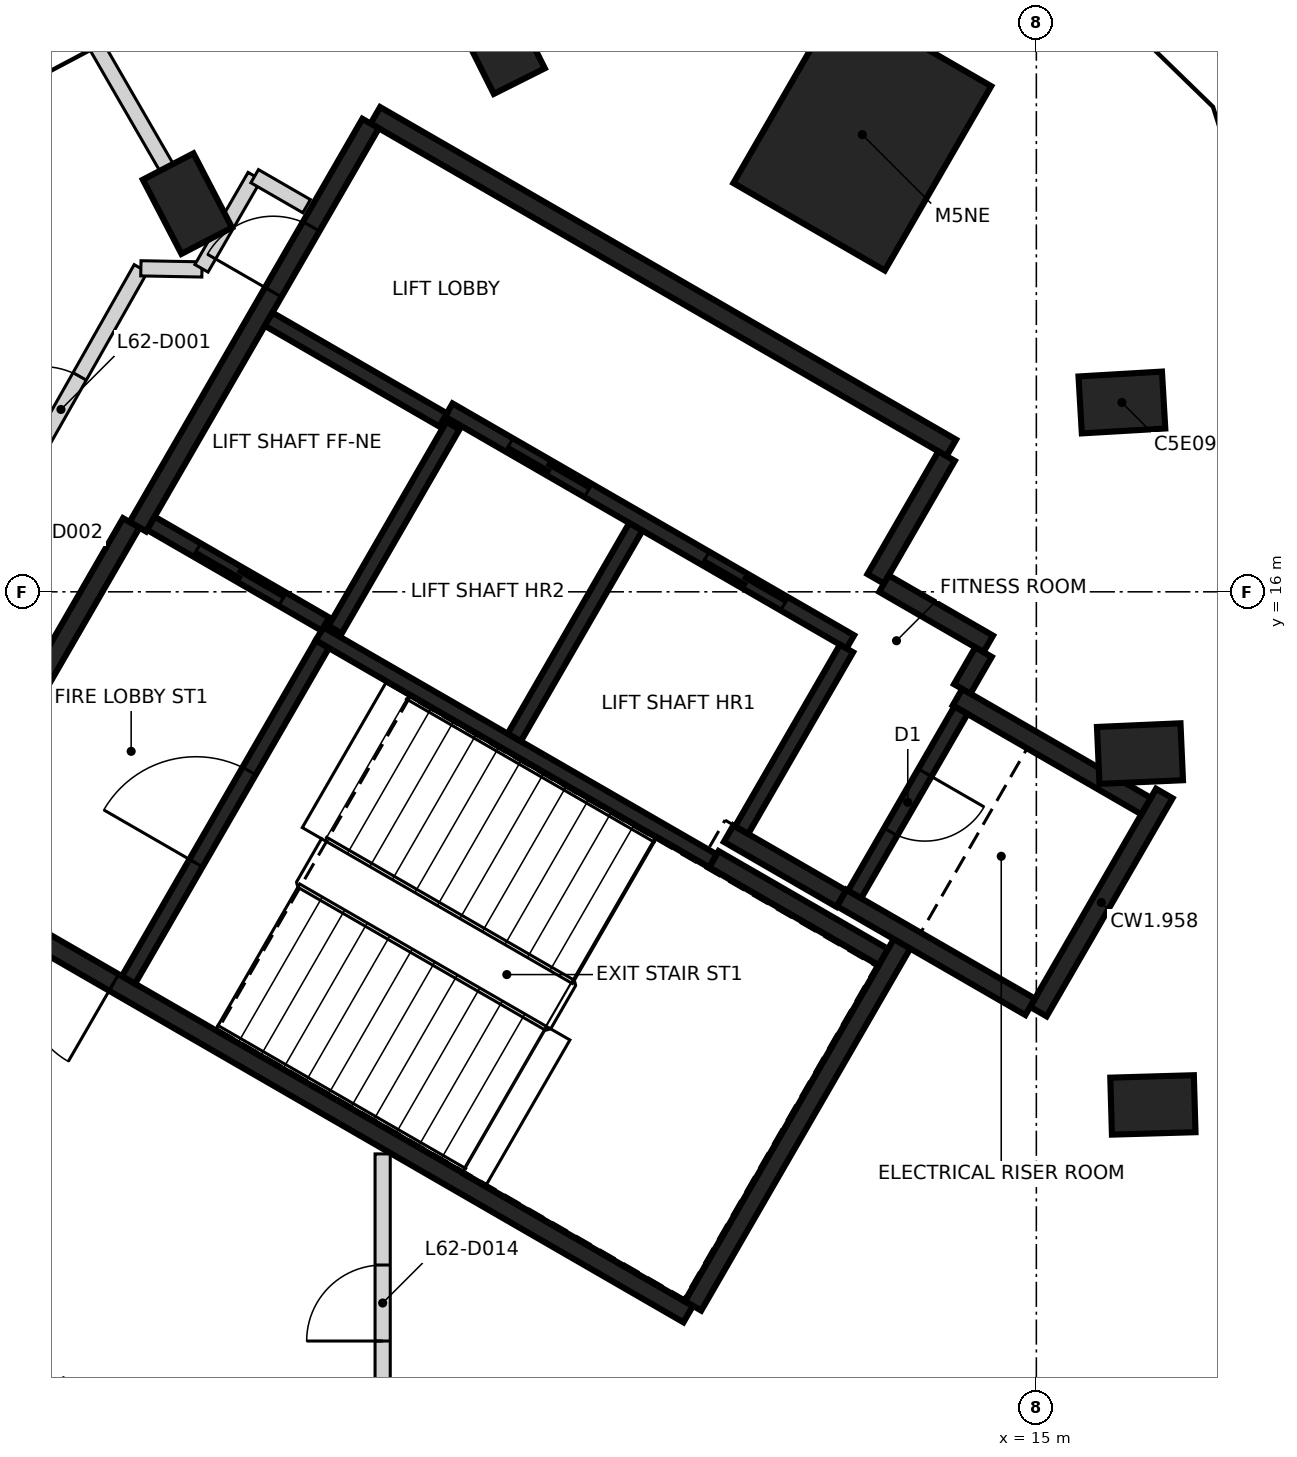
"""IFC4 building model, lengths in metres.
Left out: names, types, materials, properties, quantities, classifications, styles, units other than length and angle.
Written with IfcOpenShell. Run it as: python <this file> out.ifc"""

import sys

from ifc_helpers import new_model, si_unit, direction, frame, frame_2d, origin, origin_2d, place, context, subcontext, project, spatial, rectangle, extrude, element, fill, save


model = new_model("IFC4")
c1 = context("Model", 3, precision=1e-05, world=origin(), true_north=direction((0.0, 1.0)))
c2 = subcontext(c1, "Body", "Model", "MODEL_VIEW")
j1 = project(units=[si_unit("LENGTHUNIT", "METRE"), si_unit("PLANEANGLEUNIT", "RADIAN")], contexts=[c1])
p1 = place(None, origin())
s1 = spatial("IfcSite", under=j1, at=p1, CompositionType="ELEMENT")
p2 = place(p1, origin())
s2 = spatial("IfcBuilding", under=s1, at=p2, CompositionType="ELEMENT")
p3 = place(p2, frame((0.0, 0.0, 246.6)))
s3 = spatial("IfcBuildingStorey", under=s2, at=p3, CompositionType="ELEMENT", Elevation=246.6)
for number, where, z_axis, x_axis in (
    (1, (16.533, 9.25, -0.35), (0.0, 0.0, 1.0), (1.0, 0.029, 0.0)),
    (2, (16.363, 13.872, -0.35), (0.0, 0.0, 1.0), (0.999, 0.044, 0.0)),
    (3, (16.125, 18.491, -0.35), (0.0, 0.0, 1.0), (0.998, 0.058, 0.0)),
    (4, (7.951, 23.211, -0.35), (0.0, 0.0, 1.0), (-0.449, 0.894, 0.0)),
    (5, (3.832, 21.107, -0.35), (0.0, 0.0, 1.0), (-0.461, 0.887, 0.0)),
):
    element("IfcColumn", number, at=place(p3, frame(where, z_axis=z_axis, x_axis=x_axis)), inside=s3, PredefinedType="COLUMN", context=c2, shape_type="SweptSolid", body=[
        extrude(rectangle(XDim=1.1, YDim=0.75, at=origin_2d()), origin(), (0.0, 0.0, 1.0), 3.6),
    ])
p4 = place(p3, frame((12.71, 22.015, -0.35), z_axis=(0.0, 0.0, 1.0), x_axis=(0.5, 0.866025403784, 0.0)))
e6 = element("IfcColumn", 6, at=p4, inside=s3, PredefinedType="COLUMN", context=c2, shape_type="SweptSolid", body=[
    extrude(rectangle(XDim=2.8, YDim=2.3, at=origin_2d()), origin(), (0.0, 0.0, 1.0), 3.6),
])
p5 = place(p3, frame((10.42, 6.498, 0.0), z_axis=(0.0, 0.0, 1.0), x_axis=(-0.866021906294, 0.500006057782, 0.0)))
e7 = element("IfcWall", 7, at=p5, inside=s3, PredefinedType="SHEAR", context=c2, shape_type="SweptSolid", body=[
    extrude(rectangle(XDim=11.55, YDim=0.25, at=frame_2d((5.775, 0.0))), origin(), (0.0, 0.0, 1.0), 3.25),
])
p6 = place(p5, frame((10.025, 0.0, 0.0)))
e8 = element("IfcOpeningElement", 8, at=p6, cuts=e7, PredefinedType="OPENING", context=c2, shape_type="SweptSolid", body=[
    extrude(rectangle(XDim=1.2, YDim=2.1, at=frame_2d((0.6, 1.05))), frame((0.0, 0.135, 0.0), z_axis=(0.0, -1.0, 0.0), x_axis=(1.0, 0.0, 0.0)), (0.0, 0.0, 1.0), 0.27),
])
p7 = place(p5, frame((8.725, 0.0, 0.0)))
e9 = element("IfcOpeningElement", 9, at=p7, cuts=e7, PredefinedType="OPENING", context=c2, shape_type="SweptSolid", body=[
    extrude(rectangle(XDim=1.2, YDim=2.1, at=frame_2d((0.6, 1.05))), frame((0.0, 0.135, 0.0), z_axis=(0.0, -1.0, 0.0), x_axis=(1.0, 0.0, 0.0)), (0.0, 0.0, 1.0), 0.27),
])
p8 = place(p3, frame((6.304, 22.269, 0.0), z_axis=(0.0, 0.0, 1.0), x_axis=(0.866022959057, -0.500004234368, 0.0)))
e10 = element("IfcWall", 10, at=p8, inside=s3, PredefinedType="SHEAR", context=c2, shape_type="SweptSolid", body=[
    extrude(rectangle(XDim=8.75, YDim=0.25, at=frame_2d((4.375, 0.0))), origin(), (0.0, 0.0, 1.0), 3.25),
])
p9 = place(p3, frame((3.179, 16.856, 0.0), z_axis=(0.0, 0.0, 1.0), x_axis=(0.500001955336, 0.866024274868, 0.0)))
e11 = element("IfcWall", 11, at=p9, inside=s3, PredefinedType="SHEAR", context=c2, shape_type="SweptSolid", body=[
    extrude(rectangle(XDim=6.125, YDim=0.25, at=frame_2d((3.062, 0.0))), origin(), (0.0, 0.0, 1.0), 3.25),
])
p10 = place(p9, frame((3.563, 0.0, 0.0)))
e12 = element("IfcOpeningElement", 12, at=p10, cuts=e11, PredefinedType="OPENING", context=c2, shape_type="SweptSolid", body=[
    extrude(rectangle(XDim=1.0, YDim=2.1, at=frame_2d((0.5, 1.05))), frame((0.0, 0.135, 0.0), z_axis=(0.0, -1.0, 0.0), x_axis=(1.0, 0.0, 0.0)), (0.0, 0.0, 1.0), 0.27),
])
p11 = place(p3, frame((0.48, 12.381, 0.0), z_axis=(0.0, 0.0, 1.0), x_axis=(0.49999885962, 0.866026062182, 0.0)))
e13 = element("IfcWall", 13, at=p11, inside=s3, PredefinedType="SHEAR", context=c2, shape_type="SweptSolid", body=[
    extrude(rectangle(XDim=5.225, YDim=0.25, at=frame_2d((2.612, 0.0))), origin(), (0.0, 0.0, 1.0), 3.25),
])
p12 = place(p3, frame((13.238, 11.378, 0.0), z_axis=(0.0, 0.0, 1.0), x_axis=(-0.500008851346, -0.866020293397, 0.0)))
e14 = element("IfcWall", 14, at=p12, inside=s3, PredefinedType="SHEAR", context=c2, shape_type="SweptSolid", body=[
    extrude(rectangle(XDim=5.51, YDim=0.25, at=frame_2d((2.755, 0.0))), origin(), (0.0, 0.0, 1.0), 3.25),
])
p13 = place(p3, frame((16.684, 13.347, 0.0), z_axis=(0.0, 0.0, 1.0), x_axis=(-0.499998874531, -0.866026053573, 0.0)))
e15 = element("IfcWall", 15, at=p13, inside=s3, PredefinedType="SHEAR", context=c2, shape_type="SweptSolid", body=[
    extrude(rectangle(XDim=3.313, YDim=0.25, at=frame_2d((1.656, 0.0))), origin(), (0.0, 0.0, 1.0), 3.25),
])
p14 = place(p3, frame((14.918, 10.54, 0.0), z_axis=(0.0, 0.0, 1.0), x_axis=(-0.866063538972, 0.499933942099, 0.0)))
e16 = element("IfcWall", 16, at=p14, inside=s3, PredefinedType="SHEAR", context=c2, shape_type="SweptSolid", body=[
    extrude(rectangle(XDim=2.865, YDim=0.25, at=frame_2d((1.432, 0.0))), origin(), (0.0, 0.0, 1.0), 3.25),
])
p15 = place(p3, frame((13.963, 14.614, 0.0), z_axis=(0.0, 0.0, 1.0), x_axis=(0.866042235819, -0.499970844928, 0.0)))
e17 = element("IfcWall", 17, at=p15, inside=s3, PredefinedType="SHEAR", context=c2, shape_type="SweptSolid", body=[
    extrude(rectangle(XDim=2.865, YDim=0.25, at=frame_2d((1.432, 0.0))), origin(), (0.0, 0.0, 1.0), 3.25),
])
p16 = place(p3, frame((10.757, 12.481, 0.0), z_axis=(0.0, 0.0, 1.0), x_axis=(0.866022940537, -0.500004266446, 0.0)))
e18 = element("IfcWall", 18, at=p16, inside=s3, PredefinedType="SHEAR", context=c2, shape_type="SweptSolid", body=[
    extrude(rectangle(XDim=2.575, YDim=0.25, at=frame_2d((1.287, 0.0))), origin(), (0.0, 0.0, 1.0), 3.25),
])
p17 = place(p3, frame((13.819, 17.785, 0.0), z_axis=(0.0, 0.0, 1.0), x_axis=(-0.500039802285, -0.866002422705, 0.0)))
e19 = element("IfcWall", 19, at=p17, inside=s3, PredefinedType="SHEAR", context=c2, shape_type="SweptSolid", body=[
    extrude(rectangle(XDim=1.865, YDim=0.25, at=frame_2d((0.932, 0.0))), origin(), (0.0, 0.0, 1.0), 3.25),
])
p18 = place(p3, frame((12.433, 11.964, 0.0), z_axis=(0.0, 0.0, 1.0), x_axis=(-0.866038183914, 0.499977863513, 0.0)))
e20 = element("IfcWall", 20, at=p18, inside=s3, PredefinedType="SHEAR", context=c2, shape_type="SweptSolid", body=[
    extrude(rectangle(XDim=1.71, YDim=0.25, at=frame_2d((0.855, 0.0))), origin(), (0.0, 0.0, 1.0), 3.25),
])
p19 = place(p3, frame((12.995, 16.108, 0.0), z_axis=(0.0, 0.0, 1.0), x_axis=(0.866044474677, -0.49996696679, 0.0)))
e21 = element("IfcWall", 21, at=p19, inside=s3, PredefinedType="SHEAR", context=c2, shape_type="SweptSolid", body=[
    extrude(rectangle(XDim=1.584, YDim=0.25, at=frame_2d((0.792, 0.0))), origin(), (0.0, 0.0, 1.0), 3.25),
])
p20 = place(p3, frame((14.305, 15.207, 0.0), z_axis=(0.0, 0.0, 1.0), x_axis=(-0.499848422343, -0.866112899501, 0.0)))
e22 = element("IfcWall", 22, at=p20, inside=s3, PredefinedType="SHEAR", context=c2, shape_type="SweptSolid", body=[
    extrude(rectangle(XDim=0.559, YDim=0.25, at=frame_2d((0.28, 0.0))), origin(), (0.0, 0.0, 1.0), 3.25),
])
p21 = place(p3, frame((12.552, 15.342, 0.0), z_axis=(0.0, 0.0, 1.0), x_axis=(-0.866030299012, 0.499991521122, 0.0)))
e23 = element("IfcWall", 23, at=p21, inside=s3, PredefinedType="SHEAR", context=c2, shape_type="SweptSolid", body=[
    extrude(rectangle(XDim=6.1, YDim=0.2, at=frame_2d((3.05, 0.0))), origin(), (0.0, 0.0, 1.0), 3.25),
])
p22 = place(p21, frame((1.0, 0.0, 0.0)))
e24 = element("IfcOpeningElement", 24, at=p22, cuts=e23, PredefinedType="OPENING", context=c2, shape_type="SweptSolid", body=[
    extrude(rectangle(XDim=1.2, YDim=2.1, at=frame_2d((0.6, 1.05))), frame((0.0, 0.11, 0.0), z_axis=(0.0, -1.0, 0.0), x_axis=(1.0, 0.0, 0.0)), (0.0, 0.0, 1.0), 0.22),
])
p23 = place(p21, frame((3.982, 0.0, 0.0)))
e25 = element("IfcOpeningElement", 25, at=p23, cuts=e23, PredefinedType="OPENING", context=c2, shape_type="SweptSolid", body=[
    extrude(rectangle(XDim=1.2, YDim=2.1, at=frame_2d((0.6, 1.05))), frame((0.0, 0.11, 0.0), z_axis=(0.0, -1.0, 0.0), x_axis=(1.0, 0.0, 0.0)), (0.0, 0.0, 1.0), 0.22),
])
p24 = place(p3, frame((10.743, 12.46, 0.0), z_axis=(0.0, 0.0, 1.0), x_axis=(-0.866018848283, 0.500011354289, 0.0)))
e26 = element("IfcWall", 26, at=p24, inside=s3, PredefinedType="SHEAR", context=c2, shape_type="SweptSolid", body=[
    extrude(rectangle(XDim=5.974, YDim=0.2, at=frame_2d((2.987, 0.0))), origin(), (0.0, 0.0, 1.0), 3.25),
])
p25 = place(p3, frame((3.057, 10.895, 0.0), z_axis=(0.0, 0.0, 1.0), x_axis=(0.500027839223, 0.866009330205, 0.0)))
e27 = element("IfcWall", 27, at=p25, inside=s3, PredefinedType="SHEAR", context=c2, shape_type="SweptSolid", body=[
    extrude(rectangle(XDim=5.098, YDim=0.2, at=frame_2d((2.549, 0.0))), origin(), (0.0, 0.0, 1.0), 3.25),
])
p26 = place(p25, frame((1.774, 0.0, 0.0)))
e28 = element("IfcOpeningElement", 28, at=p26, cuts=e27, PredefinedType="OPENING", context=c2, shape_type="SweptSolid", body=[
    extrude(rectangle(XDim=1.4, YDim=2.1, at=frame_2d((0.7, 1.05))), frame((0.0, 0.11, 0.0), z_axis=(0.0, -1.0, 0.0), x_axis=(1.0, 0.0, 0.0)), (0.0, 0.0, 1.0), 0.22),
])
p27 = place(p3, frame((8.132, 14.084, 0.0), z_axis=(0.0, 0.0, 1.0), x_axis=(0.500030834389, 0.86600760081, 0.0)))
e29 = element("IfcWall", 29, at=p27, inside=s3, PredefinedType="SHEAR", context=c2, shape_type="SweptSolid", body=[
    extrude(rectangle(XDim=3.198, YDim=0.2, at=frame_2d((1.599, 0.0))), origin(), (0.0, 0.0, 1.0), 3.25),
])
p28 = place(p3, frame((14.008, 14.442, 0.0), z_axis=(0.0, 0.0, 1.0), x_axis=(-0.499986818241, -0.866033014143, 0.0)))
e30 = element("IfcWall", 30, at=p28, inside=s3, PredefinedType="SHEAR", context=c2, shape_type="SweptSolid", body=[
    extrude(rectangle(XDim=2.798, YDim=0.2, at=frame_2d((1.399, 0.0))), origin(), (0.0, 0.0, 1.0), 3.25),
])
p29 = place(p28, frame((0.949, 0.0, 0.0)))
e31 = element("IfcOpeningElement", 31, at=p29, cuts=e30, PredefinedType="OPENING", context=c2, shape_type="SweptSolid", body=[
    extrude(rectangle(XDim=0.9, YDim=2.1, at=frame_2d((0.45, 1.05))), frame((0.0, 0.11, 0.0), z_axis=(0.0, -1.0, 0.0), x_axis=(1.0, 0.0, 0.0)), (0.0, 0.0, 1.0), 0.22),
])
p30 = place(p3, frame((12.502, 15.255, 0.0), z_axis=(0.0, 0.0, 1.0), x_axis=(-0.499965018551, -0.866045599391, 0.0)))
e32 = element("IfcWall", 32, at=p30, inside=s3, PredefinedType="SHEAR", context=c2, shape_type="SweptSolid", body=[
    extrude(rectangle(XDim=2.759, YDim=0.2, at=frame_2d((1.379, 0.0))), origin(), (0.0, 0.0, 1.0), 3.25),
])
p31 = place(p3, frame((7.324, 18.187, 0.0), z_axis=(0.0, 0.0, 1.0), x_axis=(-0.499967891604, -0.866043940782, 0.0)))
e33 = element("IfcWall", 33, at=p31, inside=s3, PredefinedType="SHEAR", context=c2, shape_type="SweptSolid", body=[
    extrude(rectangle(XDim=3.1, YDim=0.2, at=frame_2d((1.55, 0.0))), origin(), (0.0, 0.0, 1.0), 3.25),
])
p32 = place(p3, frame((5.646, 15.576, 0.0), z_axis=(0.0, 0.0, 1.0), x_axis=(-0.866018407898, 0.500012117035, 0.0)))
e34 = element("IfcWall", 34, at=p32, inside=s3, PredefinedType="SHEAR", context=c2, shape_type="SweptSolid", body=[
    extrude(rectangle(XDim=2.651, YDim=0.2, at=frame_2d((1.325, 0.0))), origin(), (0.0, 0.0, 1.0), 3.25),
])
p33 = place(p32, frame((0.652, 0.0, 0.0)))
e35 = element("IfcOpeningElement", 35, at=p33, cuts=e34, PredefinedType="OPENING", context=c2, shape_type="SweptSolid", body=[
    extrude(rectangle(XDim=1.3, YDim=2.1, at=frame_2d((0.65, 1.05))), frame((0.0, 0.11, 0.0), z_axis=(0.0, -1.0, 0.0), x_axis=(1.0, 0.0, 0.0)), (0.0, 0.0, 1.0), 0.22),
])
p34 = place(p3, frame((7.196, 18.26, 0.0), z_axis=(0.0, 0.0, 1.0), x_axis=(-0.866018407898, 0.500012117035, 0.0)))
e36 = element("IfcWall", 36, at=p34, inside=s3, PredefinedType="SHEAR", context=c2, shape_type="SweptSolid", body=[
    extrude(rectangle(XDim=2.651, YDim=0.2, at=frame_2d((1.325, 0.0))), origin(), (0.0, 0.0, 1.0), 3.25),
])
p35 = place(p3, frame((-1.086, 12.651, 0.0), z_axis=(0.0, 0.0, 1.0), x_axis=(0.492590234691, 0.870261374925, 0.0)))
e37 = element("IfcWall", 37, at=p35, inside=s3, PredefinedType="PARTITIONING", context=c2, shape_type="SweptSolid", body=[
    extrude(rectangle(XDim=8.738, YDim=0.2, at=frame_2d((4.369, 0.0))), origin(), (0.0, 0.0, 1.0), 3.25),
])
p36 = place(p35, frame((6.105, 0.0, 0.0)))
e38 = element("IfcOpeningElement", 38, at=p36, cuts=e37, PredefinedType="OPENING", context=c2, shape_type="SweptSolid", body=[
    extrude(rectangle(XDim=1.0, YDim=2.1, at=frame_2d((0.5, 1.05))), frame((0.0, 0.11, 0.0), z_axis=(0.0, -1.0, 0.0), x_axis=(1.0, 0.0, 0.0)), (0.0, 0.0, 1.0), 0.22),
])
p37 = place(p35, frame((3.25, 0.0, 0.0)))
e39 = element("IfcOpeningElement", 39, at=p37, cuts=e37, PredefinedType="OPENING", context=c2, shape_type="SweptSolid", body=[
    extrude(rectangle(XDim=0.95, YDim=2.1, at=frame_2d((0.475, 1.05))), frame((0.0, 0.11, 0.0), z_axis=(0.0, -1.0, 0.0), x_axis=(1.0, 0.0, 0.0)), (0.0, 0.0, 1.0), 0.22),
])
p38 = place(p3, frame((3.219, 20.256, 0.0), z_axis=(0.0, 0.0, 1.0), x_axis=(0.99982280377, -0.018824480363, 0.0)))
e40 = element("IfcWall", 40, at=p38, inside=s3, PredefinedType="PARTITIONING", context=c2, shape_type="SweptSolid", body=[
    extrude(rectangle(XDim=0.804, YDim=0.2, at=frame_2d((0.402, 0.0))), origin(), (0.0, 0.0, 1.0), 3.25),
])
p39 = place(p3, frame((4.016, 20.256, 0.0), z_axis=(0.0, 0.0, 1.0), x_axis=(0.500135180047, 0.865947343479, 0.0)))
e41 = element("IfcWall", 41, at=p39, inside=s3, PredefinedType="PARTITIONING", context=c2, shape_type="SweptSolid", body=[
    extrude(rectangle(XDim=1.399, YDim=0.2, at=frame_2d((0.7, 0.0))), origin(), (0.0, 0.0, 1.0), 2.35),
])
p40 = place(p3, frame((4.716, 21.468, 0.0), z_axis=(0.0, 0.0, 1.0), x_axis=(0.865912682783, -0.500195187698, 0.0)))
e42 = element("IfcWall", 42, at=p40, inside=s3, PredefinedType="PARTITIONING", context=c2, shape_type="SweptSolid", body=[
    extrude(rectangle(XDim=0.79, YDim=0.2, at=frame_2d((0.395, 0.0))), origin(), (0.0, 0.0, 1.0), 2.35),
])
p41 = place(p3, frame((6.4, -4.721, 0.0), z_axis=(0.0, 0.0, 1.0), x_axis=(0.0, 1.0, 0.0)))
e43 = element("IfcWall", 43, at=p41, inside=s3, PredefinedType="PARTITIONING", context=c2, shape_type="SweptSolid", body=[
    extrude(rectangle(XDim=13.326, YDim=0.2, at=frame_2d((6.663, 0.0))), origin(), (0.0, 0.0, 1.0), 3.25),
])
p42 = place(p41, frame((4.021, 0.0, 0.0)))
e44 = element("IfcOpeningElement", 44, at=p42, cuts=e43, PredefinedType="OPENING", context=c2, shape_type="SweptSolid", body=[
    extrude(rectangle(XDim=1.4, YDim=2.1, at=frame_2d((0.7, 1.05))), frame((0.0, 0.11, 0.0), z_axis=(0.0, -1.0, 0.0), x_axis=(1.0, 0.0, 0.0)), (0.0, 0.0, 1.0), 0.22),
])
p43 = place(p41, frame((10.865, 0.0, 0.0)))
e45 = element("IfcOpeningElement", 45, at=p43, cuts=e43, PredefinedType="OPENING", context=c2, shape_type="SweptSolid", body=[
    extrude(rectangle(XDim=1.0, YDim=2.1, at=frame_2d((0.5, 1.05))), frame((0.0, 0.11, 0.0), z_axis=(0.0, -1.0, 0.0), x_axis=(1.0, 0.0, 0.0)), (0.0, 0.0, 1.0), 0.22),
])
p44 = place(p3, frame((2.64, 23.17, 0.0), z_axis=(0.0, 0.0, 1.0), x_axis=(0.49992507759, -0.866068655937, 0.0)))
e46 = element("IfcWall", 46, at=p44, inside=s3, PredefinedType="PARTITIONING", context=c2, shape_type="SweptSolid", body=[
    extrude(rectangle(XDim=2.712, YDim=0.2, at=frame_2d((1.356, 0.0))), origin(), (0.0, 0.0, 1.0), 3.25),
])
p45 = place(p33, origin())
e47 = element("IfcDoor", 47, at=p45, inside=s3, OperationType="SLIDING_TO_LEFT", PredefinedType="DOOR", context=c2, shape_type="SweptSolid", body=[
    extrude(rectangle(XDim=1.3, YDim=2.1, at=frame_2d((0.65, 1.05))), frame((0.0, 0.025, 0.0), z_axis=(0.0, -1.0, 0.0), x_axis=(1.0, 0.0, 0.0)), (0.0, 0.0, 1.0), 0.05),
])
fill(e35, e47)
p46 = place(p22, origin())
e48 = element("IfcDoor", 48, at=p46, inside=s3, OperationType="DOUBLE_DOOR_SLIDING", PredefinedType="DOOR", context=c2, shape_type="SweptSolid", body=[
    extrude(rectangle(XDim=1.2, YDim=2.1, at=frame_2d((0.6, 1.05))), frame((0.0, 0.025, 0.0), z_axis=(0.0, -1.0, 0.0), x_axis=(1.0, 0.0, 0.0)), (0.0, 0.0, 1.0), 0.05),
])
fill(e24, e48)
p47 = place(p23, origin())
e49 = element("IfcDoor", 49, at=p47, inside=s3, OperationType="DOUBLE_DOOR_SLIDING", PredefinedType="DOOR", context=c2, shape_type="SweptSolid", body=[
    extrude(rectangle(XDim=1.2, YDim=2.1, at=frame_2d((0.6, 1.05))), frame((0.0, 0.025, 0.0), z_axis=(0.0, -1.0, 0.0), x_axis=(1.0, 0.0, 0.0)), (0.0, 0.0, 1.0), 0.05),
])
fill(e25, e49)
p48 = place(p10, origin())
e50 = element("IfcDoor", 50, at=p48, inside=s3, OperationType="SINGLE_SWING_LEFT", PredefinedType="DOOR", context=c2, shape_type="SweptSolid", body=[
    extrude(rectangle(XDim=1.0, YDim=2.1, at=frame_2d((0.5, 1.05))), frame((0.0, 0.025, 0.0), z_axis=(0.0, -1.0, 0.0), x_axis=(1.0, 0.0, 0.0)), (0.0, 0.0, 1.0), 0.05),
])
fill(e12, e50)
p49 = place(p7, origin())
e51 = element("IfcDoor", 51, at=p49, inside=s3, OperationType="SINGLE_SWING_RIGHT", PredefinedType="DOOR", context=c2, shape_type="SweptSolid", body=[
    extrude(rectangle(XDim=1.2, YDim=2.1, at=frame_2d((0.6, 1.05))), frame((0.0, 0.025, 0.0), z_axis=(0.0, -1.0, 0.0), x_axis=(1.0, 0.0, 0.0)), (0.0, 0.0, 1.0), 0.05),
])
fill(e9, e51)
p50 = place(p26, origin())
e52 = element("IfcDoor", 52, at=p50, inside=s3, OperationType="SINGLE_SWING_LEFT", PredefinedType="DOOR", context=c2, shape_type="SweptSolid", body=[
    extrude(rectangle(XDim=1.4, YDim=2.1, at=frame_2d((0.7, 1.05))), frame((0.0, 0.025, 0.0), z_axis=(0.0, -1.0, 0.0), x_axis=(1.0, 0.0, 0.0)), (0.0, 0.0, 1.0), 0.05),
])
fill(e28, e52)
p51 = place(p29, origin())
e53 = element("IfcDoor", 53, at=p51, inside=s3, OperationType="SINGLE_SWING_RIGHT", PredefinedType="DOOR", context=c2, shape_type="SweptSolid", body=[
    extrude(rectangle(XDim=0.9, YDim=2.1, at=frame_2d((0.45, 1.05))), frame((0.0, 0.025, 0.0), z_axis=(0.0, -1.0, 0.0), x_axis=(1.0, 0.0, 0.0)), (0.0, 0.0, 1.0), 0.05),
])
fill(e31, e53)
p52 = place(p36, origin())
e54 = element("IfcDoor", 54, at=p52, inside=s3, OperationType="SINGLE_SWING_LEFT", PredefinedType="DOOR", context=c2, shape_type="SweptSolid", body=[
    extrude(rectangle(XDim=1.0, YDim=2.1, at=frame_2d((0.5, 1.05))), frame((0.0, 0.025, 0.0), z_axis=(0.0, -1.0, 0.0), x_axis=(1.0, 0.0, 0.0)), (0.0, 0.0, 1.0), 0.05),
])
fill(e38, e54)
p53 = place(p43, frame((1.0, 0.0, 0.0), z_axis=(0.0, 0.0, 1.0), x_axis=(-1.0, 0.0, 0.0)))
e55 = element("IfcDoor", 55, at=p53, inside=s3, OperationType="SINGLE_SWING_LEFT", PredefinedType="DOOR", context=c2, shape_type="SweptSolid", body=[
    extrude(rectangle(XDim=1.0, YDim=2.1, at=frame_2d((0.5, 1.05))), frame((0.0, 0.025, 0.0), z_axis=(0.0, -1.0, 0.0), x_axis=(1.0, 0.0, 0.0)), (0.0, 0.0, 1.0), 0.05),
])
fill(e45, e55)
save(model, sys.argv[1])
